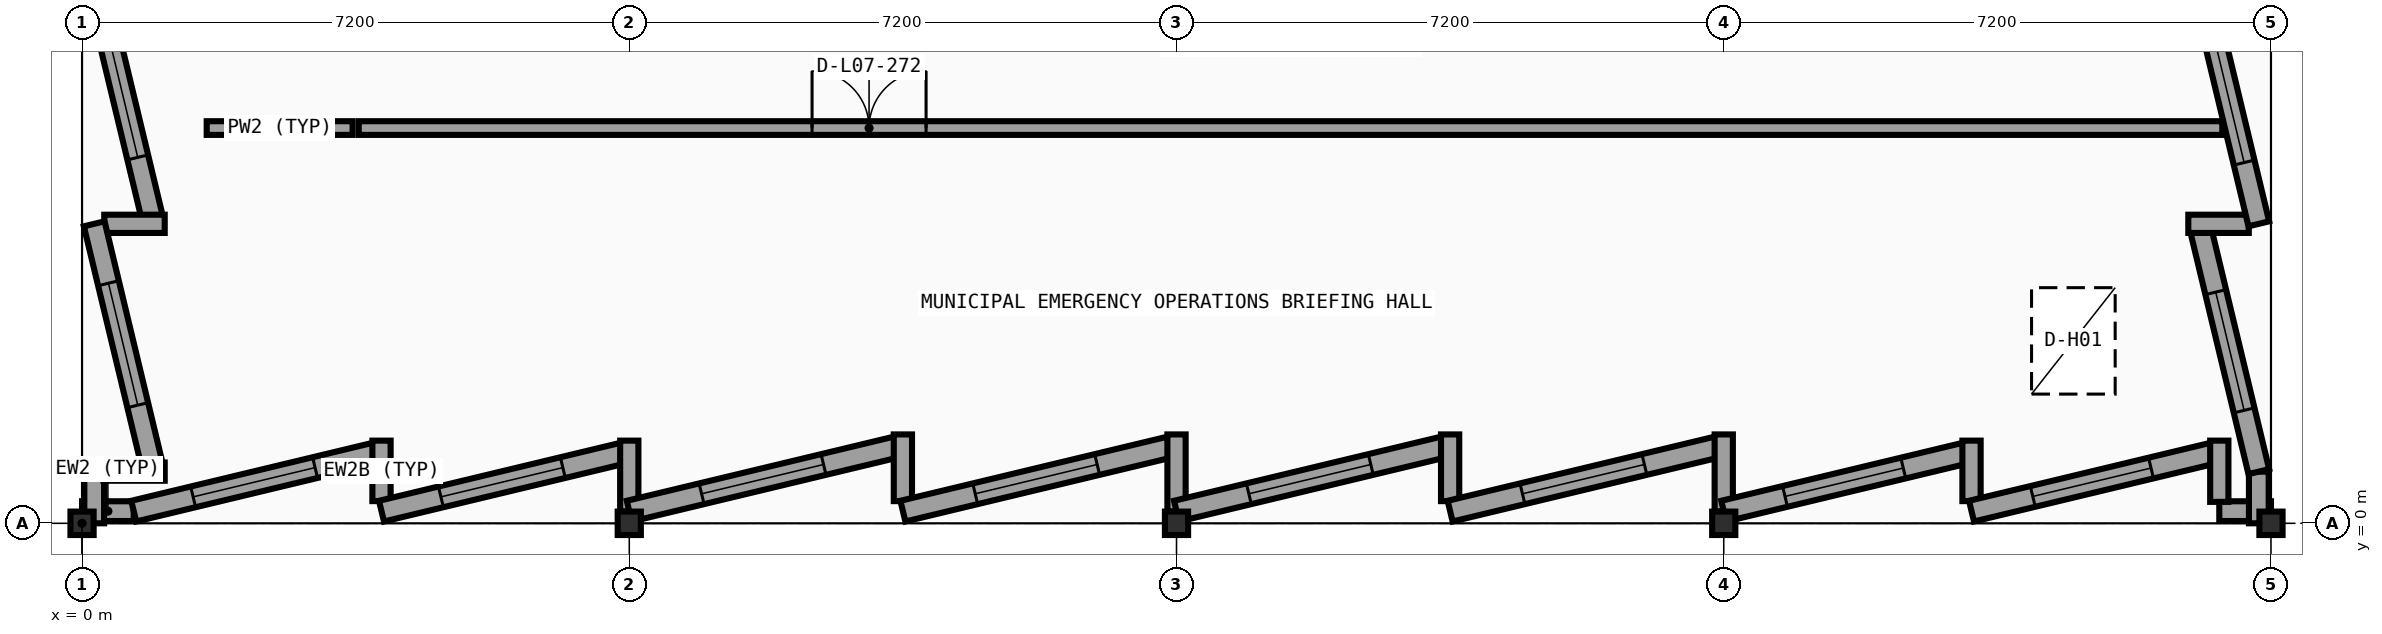
"""IFC4 building model, lengths in metres.
Left out: names, types, materials, properties, quantities, classifications, styles, units other than length and angle.
Written with IfcOpenShell. Run it as: python <this file> out.ifc"""

import sys

from ifc_helpers import new_model, si_unit, direction, frame, frame_2d, origin, origin_2d, place, context, subcontext, project, spatial, rectangle, i_section, extrude, element, fill, save


model = new_model("IFC4")
c1 = context("Model", 3, precision=1e-05, world=origin(), true_north=direction((0.0, 1.0)))
c2 = subcontext(c1, "Body", "Model", "MODEL_VIEW")
j1 = project(units=[si_unit("LENGTHUNIT", "METRE"), si_unit("PLANEANGLEUNIT", "RADIAN")], contexts=[c1])
p1 = place(None, origin())
s1 = spatial("IfcSite", under=j1, at=p1, CompositionType="ELEMENT")
p2 = place(p1, origin())
s2 = spatial("IfcBuilding", under=s1, at=p2, CompositionType="ELEMENT")
p3 = place(p2, frame((0.0, 0.0, 31.05)))
s3 = spatial("IfcBuildingStorey", under=s2, at=p3, CompositionType="ELEMENT", Elevation=31.05)
for number, where, z_axis, x_axis in (
    (1, (0.0, 0.0, 0.0), (0.0, 0.0, 1.0), (1.0, 0.0, 0.0)),
    (2, (7.2, 0.0, 0.0), (0.0, 0.0, 1.0), (1.0, 0.0, 0.0)),
    (3, (14.4, 0.0, 0.0), (0.0, 0.0, 1.0), (1.0, 0.0, 0.0)),
    (4, (21.6, 0.0, 0.0), (0.0, 0.0, 1.0), (1.0, 0.0, 0.0)),
    (5, (28.8, 0.0, 0.0), (0.0, 0.0, 1.0), (1.0, 0.0, 0.0)),
):
    element("IfcColumn", number, at=place(p3, frame(where, z_axis=z_axis, x_axis=x_axis)), inside=s3, PredefinedType="COLUMN", context=c2, shape_type="SweptSolid", body=[
        extrude(i_section(OverallWidth=0.305, OverallDepth=0.308, WebThickness=0.01, FlangeThickness=0.015, FilletRadius=0.015, at=origin_2d()), origin(), (0.0, 0.0, 1.0), 4.2),
    ])
p4 = place(p3, frame((0.0, 0.16, 0.0), z_axis=(0.0, 0.0, 1.0), x_axis=(1.0, 0.0, 0.0)))
e6 = element("IfcWall", 6, at=p4, inside=s3, PredefinedType="SOLIDWALL", context=c2, shape_type="SweptSolid", body=[
    extrude(rectangle(XDim=0.68, YDim=0.26, at=frame_2d((0.34, 0.0))), origin(), (0.0, 0.0, 1.0), 3.95),
])
p5 = place(p3, frame((0.68, 0.16, 0.0), z_axis=(0.0, 0.0, 1.0), x_axis=(0.972370292931, 0.233443812137, 0.0)))
e7 = element("IfcWall", 7, at=p5, inside=s3, PredefinedType="SOLIDWALL", context=c2, shape_type="SweptSolid", body=[
    extrude(rectangle(XDim=3.258, YDim=0.28, at=frame_2d((1.629, 0.0))), origin(), (0.0, 0.0, 1.0), 3.95),
])
p6 = place(p5, frame((0.804, 0.0, 0.8)))
e8 = element("IfcOpeningElement", 8, at=p6, cuts=e7, PredefinedType="OPENING", context=c2, shape_type="SweptSolid", body=[
    extrude(rectangle(XDim=1.65, YDim=1.9, at=frame_2d((0.825, 0.95))), frame((0.0, 0.15, 0.0), z_axis=(0.0, -1.0, 0.0), x_axis=(1.0, 0.0, 0.0)), (0.0, 0.0, 1.0), 0.3),
])
p7 = place(p3, frame((3.94, 1.088, 0.0), z_axis=(0.0, 0.0, 1.0), x_axis=(0.0, -1.0, 0.0)))
e9 = element("IfcWall", 9, at=p7, inside=s3, PredefinedType="SOLIDWALL", context=c2, shape_type="SweptSolid", body=[
    extrude(rectangle(XDim=0.796, YDim=0.24, at=frame_2d((0.398, 0.0))), origin(), (0.0, 0.0, 1.0), 3.95),
])
p8 = place(p3, frame((3.94, 0.16, 0.0), z_axis=(0.0, 0.0, 1.0), x_axis=(0.972370292931, 0.233443812137, 0.0)))
e10 = element("IfcWall", 10, at=p8, inside=s3, PredefinedType="SOLIDWALL", context=c2, shape_type="SweptSolid", body=[
    extrude(rectangle(XDim=3.258, YDim=0.28, at=frame_2d((1.629, 0.0))), origin(), (0.0, 0.0, 1.0), 3.95),
])
p9 = place(p8, frame((0.804, 0.0, 0.8)))
e11 = element("IfcOpeningElement", 11, at=p9, cuts=e10, PredefinedType="OPENING", context=c2, shape_type="SweptSolid", body=[
    extrude(rectangle(XDim=1.65, YDim=1.9, at=frame_2d((0.825, 0.95))), frame((0.0, 0.15, 0.0), z_axis=(0.0, -1.0, 0.0), x_axis=(1.0, 0.0, 0.0)), (0.0, 0.0, 1.0), 0.3),
])
p10 = place(p3, frame((7.2, 1.088, 0.0), z_axis=(0.0, 0.0, 1.0), x_axis=(0.0, -1.0, 0.0)))
e12 = element("IfcWall", 12, at=p10, inside=s3, PredefinedType="SOLIDWALL", context=c2, shape_type="SweptSolid", body=[
    extrude(rectangle(XDim=0.932, YDim=0.24, at=frame_2d((0.466, 0.0))), origin(), (0.0, 0.0, 1.0), 3.95),
])
p11 = place(p3, frame((7.2, 0.16, 0.0), z_axis=(0.0, 0.0, 1.0), x_axis=(0.972357805829, 0.233495818898, 0.0)))
e13 = element("IfcWall", 13, at=p11, inside=s3, PredefinedType="SOLIDWALL", context=c2, shape_type="SweptSolid", body=[
    extrude(rectangle(XDim=3.607, YDim=0.28, at=frame_2d((1.804, 0.0))), origin(), (0.0, 0.0, 1.0), 3.95),
])
p12 = place(p11, frame((0.979, 0.0, 0.8)))
e14 = element("IfcOpeningElement", 14, at=p12, cuts=e13, PredefinedType="OPENING", context=c2, shape_type="SweptSolid", body=[
    extrude(rectangle(XDim=1.65, YDim=1.9, at=frame_2d((0.825, 0.95))), frame((0.0, 0.15, 0.0), z_axis=(0.0, -1.0, 0.0), x_axis=(1.0, 0.0, 0.0)), (0.0, 0.0, 1.0), 0.3),
])
p13 = place(p3, frame((10.8, 1.169, 0.0), z_axis=(0.0, 0.0, 1.0), x_axis=(0.0, -1.0, 0.0)))
e15 = element("IfcWall", 15, at=p13, inside=s3, PredefinedType="SOLIDWALL", context=c2, shape_type="SweptSolid", body=[
    extrude(rectangle(XDim=0.877, YDim=0.24, at=frame_2d((0.438, 0.0))), origin(), (0.0, 0.0, 1.0), 3.95),
])
p14 = place(p3, frame((10.8, 0.16, 0.0), z_axis=(0.0, 0.0, 1.0), x_axis=(0.972357805829, 0.233495818898, 0.0)))
e16 = element("IfcWall", 16, at=p14, inside=s3, PredefinedType="SOLIDWALL", context=c2, shape_type="SweptSolid", body=[
    extrude(rectangle(XDim=3.607, YDim=0.28, at=frame_2d((1.804, 0.0))), origin(), (0.0, 0.0, 1.0), 3.95),
])
p15 = place(p14, frame((0.979, 0.0, 0.8)))
e17 = element("IfcOpeningElement", 17, at=p15, cuts=e16, PredefinedType="OPENING", context=c2, shape_type="SweptSolid", body=[
    extrude(rectangle(XDim=1.65, YDim=1.9, at=frame_2d((0.825, 0.95))), frame((0.0, 0.15, 0.0), z_axis=(0.0, -1.0, 0.0), x_axis=(1.0, 0.0, 0.0)), (0.0, 0.0, 1.0), 0.3),
])
p16 = place(p3, frame((14.4, 1.169, 0.0), z_axis=(0.0, 0.0, 1.0), x_axis=(0.0, -1.0, 0.0)))
e18 = element("IfcWall", 18, at=p16, inside=s3, PredefinedType="SOLIDWALL", context=c2, shape_type="SweptSolid", body=[
    extrude(rectangle(XDim=1.013, YDim=0.24, at=frame_2d((0.507, 0.0))), origin(), (0.0, 0.0, 1.0), 3.95),
])
p17 = place(p3, frame((14.4, 0.16, 0.0), z_axis=(0.0, 0.0, 1.0), x_axis=(0.972361495396, 0.233480453725, 0.0)))
e19 = element("IfcWall", 19, at=p17, inside=s3, PredefinedType="SOLIDWALL", context=c2, shape_type="SweptSolid", body=[
    extrude(rectangle(XDim=3.607, YDim=0.28, at=frame_2d((1.804, 0.0))), origin(), (0.0, 0.0, 1.0), 3.95),
])
p18 = place(p17, frame((0.979, 0.0, 0.8)))
e20 = element("IfcOpeningElement", 20, at=p18, cuts=e19, PredefinedType="OPENING", context=c2, shape_type="SweptSolid", body=[
    extrude(rectangle(XDim=1.65, YDim=1.9, at=frame_2d((0.825, 0.95))), frame((0.0, 0.15, 0.0), z_axis=(0.0, -1.0, 0.0), x_axis=(1.0, 0.0, 0.0)), (0.0, 0.0, 1.0), 0.3),
])
p19 = place(p3, frame((18.0, 1.169, 0.0), z_axis=(0.0, 0.0, 1.0), x_axis=(0.0, -1.0, 0.0)))
e21 = element("IfcWall", 21, at=p19, inside=s3, PredefinedType="SOLIDWALL", context=c2, shape_type="SweptSolid", body=[
    extrude(rectangle(XDim=0.877, YDim=0.24, at=frame_2d((0.438, 0.0))), origin(), (0.0, 0.0, 1.0), 3.95),
])
p20 = place(p3, frame((18.0, 0.16, 0.0), z_axis=(0.0, 0.0, 1.0), x_axis=(0.972357805829, 0.233495818898, 0.0)))
e22 = element("IfcWall", 22, at=p20, inside=s3, PredefinedType="SOLIDWALL", context=c2, shape_type="SweptSolid", body=[
    extrude(rectangle(XDim=3.607, YDim=0.28, at=frame_2d((1.804, 0.0))), origin(), (0.0, 0.0, 1.0), 3.95),
])
p21 = place(p20, frame((0.979, 0.0, 0.8)))
e23 = element("IfcOpeningElement", 23, at=p21, cuts=e22, PredefinedType="OPENING", context=c2, shape_type="SweptSolid", body=[
    extrude(rectangle(XDim=1.65, YDim=1.9, at=frame_2d((0.825, 0.95))), frame((0.0, 0.15, 0.0), z_axis=(0.0, -1.0, 0.0), x_axis=(1.0, 0.0, 0.0)), (0.0, 0.0, 1.0), 0.3),
])
p22 = place(p3, frame((21.6, 1.169, 0.0), z_axis=(0.0, 0.0, 1.0), x_axis=(0.0, -1.0, 0.0)))
e24 = element("IfcWall", 24, at=p22, inside=s3, PredefinedType="SOLIDWALL", context=c2, shape_type="SweptSolid", body=[
    extrude(rectangle(XDim=1.013, YDim=0.24, at=frame_2d((0.507, 0.0))), origin(), (0.0, 0.0, 1.0), 3.95),
])
p23 = place(p3, frame((28.12, 0.16, 0.0), z_axis=(0.0, 0.0, 1.0), x_axis=(1.0, 0.0, 0.0)))
e25 = element("IfcWall", 25, at=p23, inside=s3, PredefinedType="SOLIDWALL", context=c2, shape_type="SweptSolid", body=[
    extrude(rectangle(XDim=0.68, YDim=0.26, at=frame_2d((0.34, 0.0))), origin(), (0.0, 0.0, 1.0), 3.95),
])
p24 = place(p3, frame((21.6, 0.16, 0.0), z_axis=(0.0, 0.0, 1.0), x_axis=(0.972366208453, 0.233460824675, 0.0)))
e26 = element("IfcWall", 26, at=p24, inside=s3, PredefinedType="SOLIDWALL", context=c2, shape_type="SweptSolid", body=[
    extrude(rectangle(XDim=3.258, YDim=0.28, at=frame_2d((1.629, 0.0))), origin(), (0.0, 0.0, 1.0), 3.95),
])
p25 = place(p24, frame((0.829, 0.0, 0.8)))
e27 = element("IfcOpeningElement", 27, at=p25, cuts=e26, PredefinedType="OPENING", context=c2, shape_type="SweptSolid", body=[
    extrude(rectangle(XDim=1.6, YDim=1.75, at=frame_2d((0.8, 0.875))), frame((0.0, 0.15, 0.0), z_axis=(0.0, -1.0, 0.0), x_axis=(1.0, 0.0, 0.0)), (0.0, 0.0, 1.0), 0.3),
])
p26 = place(p3, frame((24.86, 1.088, 0.0), z_axis=(0.0, 0.0, 1.0), x_axis=(0.0, -1.0, 0.0)))
e28 = element("IfcWall", 28, at=p26, inside=s3, PredefinedType="SOLIDWALL", context=c2, shape_type="SweptSolid", body=[
    extrude(rectangle(XDim=0.796, YDim=0.24, at=frame_2d((0.398, 0.0))), origin(), (0.0, 0.0, 1.0), 3.95),
])
p27 = place(p3, frame((24.86, 0.16, 0.0), z_axis=(0.0, 0.0, 1.0), x_axis=(0.972366208453, 0.233460824675, 0.0)))
e29 = element("IfcWall", 29, at=p27, inside=s3, PredefinedType="SOLIDWALL", context=c2, shape_type="SweptSolid", body=[
    extrude(rectangle(XDim=3.258, YDim=0.28, at=frame_2d((1.629, 0.0))), origin(), (0.0, 0.0, 1.0), 3.95),
])
p28 = place(p27, frame((0.829, 0.0, 0.8)))
e30 = element("IfcOpeningElement", 30, at=p28, cuts=e29, PredefinedType="OPENING", context=c2, shape_type="SweptSolid", body=[
    extrude(rectangle(XDim=1.6, YDim=1.75, at=frame_2d((0.8, 0.875))), frame((0.0, 0.15, 0.0), z_axis=(0.0, -1.0, 0.0), x_axis=(1.0, 0.0, 0.0)), (0.0, 0.0, 1.0), 0.3),
])
p29 = place(p3, frame((28.12, 1.088, 0.0), z_axis=(0.0, 0.0, 1.0), x_axis=(0.0, -1.0, 0.0)))
e31 = element("IfcWall", 31, at=p29, inside=s3, PredefinedType="SOLIDWALL", context=c2, shape_type="SweptSolid", body=[
    extrude(rectangle(XDim=0.806, YDim=0.24, at=frame_2d((0.403, 0.0))), origin(), (0.0, 0.0, 1.0), 3.95),
])
p30 = place(p3, frame((28.64, 0.0, 0.0), z_axis=(0.0, 0.0, 1.0), x_axis=(0.0, 1.0, 0.0)))
e32 = element("IfcWall", 32, at=p30, inside=s3, PredefinedType="SOLIDWALL", context=c2, shape_type="SweptSolid", body=[
    extrude(rectangle(XDim=0.68, YDim=0.26, at=frame_2d((0.34, 0.0))), origin(), (0.0, 0.0, 1.0), 3.95),
])
p31 = place(p3, frame((28.64, 0.68, 0.0), z_axis=(0.0, 0.0, 1.0), x_axis=(-0.233443812137, 0.972370292931, 0.0)))
e33 = element("IfcWall", 33, at=p31, inside=s3, PredefinedType="SOLIDWALL", context=c2, shape_type="SweptSolid", body=[
    extrude(rectangle(XDim=3.258, YDim=0.28, at=frame_2d((1.629, 0.0))), origin(), (0.0, 0.0, 1.0), 3.95),
])
p32 = place(p31, frame((0.829, 0.0, 0.8)))
e34 = element("IfcOpeningElement", 34, at=p32, cuts=e33, PredefinedType="OPENING", context=c2, shape_type="SweptSolid", body=[
    extrude(rectangle(XDim=1.6, YDim=1.75, at=frame_2d((0.8, 0.875))), frame((0.0, 0.15, 0.0), z_axis=(0.0, -1.0, 0.0), x_axis=(1.0, 0.0, 0.0)), (0.0, 0.0, 1.0), 0.3),
])
p33 = place(p3, frame((27.712, 3.94, 0.0), z_axis=(0.0, 0.0, 1.0), x_axis=(1.0, 0.0, 0.0)))
e35 = element("IfcWall", 35, at=p33, inside=s3, PredefinedType="SOLIDWALL", context=c2, shape_type="SweptSolid", body=[
    extrude(rectangle(XDim=0.796, YDim=0.24, at=frame_2d((0.398, 0.0))), origin(), (0.0, 0.0, 1.0), 3.95),
])
p34 = place(p3, frame((28.64, 3.94, 0.0), z_axis=(0.0, 0.0, 1.0), x_axis=(-0.233443812137, 0.972370292931, 0.0)))
e36 = element("IfcWall", 36, at=p34, inside=s3, PredefinedType="SOLIDWALL", context=c2, shape_type="SweptSolid", body=[
    extrude(rectangle(XDim=3.258, YDim=0.28, at=frame_2d((1.629, 0.0))), origin(), (0.0, 0.0, 1.0), 3.95),
])
p35 = place(p34, frame((0.829, 0.0, 0.8)))
e37 = element("IfcOpeningElement", 37, at=p35, cuts=e36, PredefinedType="OPENING", context=c2, shape_type="SweptSolid", body=[
    extrude(rectangle(XDim=1.6, YDim=1.75, at=frame_2d((0.8, 0.875))), frame((0.0, 0.15, 0.0), z_axis=(0.0, -1.0, 0.0), x_axis=(1.0, 0.0, 0.0)), (0.0, 0.0, 1.0), 0.3),
])
p36 = place(p3, frame((0.16, 0.68, 0.0), z_axis=(0.0, 0.0, 1.0), x_axis=(0.0, -1.0, 0.0)))
e38 = element("IfcWall", 38, at=p36, inside=s3, PredefinedType="SOLIDWALL", context=c2, shape_type="SweptSolid", body=[
    extrude(rectangle(XDim=0.68, YDim=0.26, at=frame_2d((0.34, 0.0))), origin(), (0.0, 0.0, 1.0), 3.95),
])
p37 = place(p3, frame((0.16, 7.2, 0.0), z_axis=(0.0, 0.0, 1.0), x_axis=(0.233460824675, -0.972366208453, 0.0)))
e39 = element("IfcWall", 39, at=p37, inside=s3, PredefinedType="SOLIDWALL", context=c2, shape_type="SweptSolid", body=[
    extrude(rectangle(XDim=3.258, YDim=0.28, at=frame_2d((1.629, 0.0))), origin(), (0.0, 0.0, 1.0), 3.95),
])
p38 = place(p37, frame((0.804, 0.0, 0.8)))
e40 = element("IfcOpeningElement", 40, at=p38, cuts=e39, PredefinedType="OPENING", context=c2, shape_type="SweptSolid", body=[
    extrude(rectangle(XDim=1.65, YDim=1.9, at=frame_2d((0.825, 0.95))), frame((0.0, 0.15, 0.0), z_axis=(0.0, -1.0, 0.0), x_axis=(1.0, 0.0, 0.0)), (0.0, 0.0, 1.0), 0.3),
])
p39 = place(p3, frame((1.088, 3.94, 0.0), z_axis=(0.0, 0.0, 1.0), x_axis=(-1.0, 0.0, 0.0)))
e41 = element("IfcWall", 41, at=p39, inside=s3, PredefinedType="SOLIDWALL", context=c2, shape_type="SweptSolid", body=[
    extrude(rectangle(XDim=0.796, YDim=0.24, at=frame_2d((0.398, 0.0))), origin(), (0.0, 0.0, 1.0), 3.95),
])
p40 = place(p3, frame((0.16, 3.94, 0.0), z_axis=(0.0, 0.0, 1.0), x_axis=(0.233460824675, -0.972366208453, 0.0)))
e42 = element("IfcWall", 42, at=p40, inside=s3, PredefinedType="SOLIDWALL", context=c2, shape_type="SweptSolid", body=[
    extrude(rectangle(XDim=3.258, YDim=0.28, at=frame_2d((1.629, 0.0))), origin(), (0.0, 0.0, 1.0), 3.95),
])
p41 = place(p40, frame((0.804, 0.0, 0.8)))
e43 = element("IfcOpeningElement", 43, at=p41, cuts=e42, PredefinedType="OPENING", context=c2, shape_type="SweptSolid", body=[
    extrude(rectangle(XDim=1.65, YDim=1.9, at=frame_2d((0.825, 0.95))), frame((0.0, 0.15, 0.0), z_axis=(0.0, -1.0, 0.0), x_axis=(1.0, 0.0, 0.0)), (0.0, 0.0, 1.0), 0.3),
])
p42 = place(p3, frame((1.088, 0.68, 0.0), z_axis=(0.0, 0.0, 1.0), x_axis=(-1.0, 0.0, 0.0)))
e44 = element("IfcWall", 44, at=p42, inside=s3, PredefinedType="SOLIDWALL", context=c2, shape_type="SweptSolid", body=[
    extrude(rectangle(XDim=0.806, YDim=0.24, at=frame_2d((0.403, 0.0))), origin(), (0.0, 0.0, 1.0), 3.95),
])
p43 = place(p3, frame((1.64, 5.2, 0.0), z_axis=(0.0, 0.0, 1.0), x_axis=(1.0, 0.0, 0.0)))
e45 = element("IfcWall", 45, at=p43, inside=s3, PredefinedType="PARTITIONING", context=c2, shape_type="SweptSolid", body=[
    extrude(rectangle(XDim=1.92, YDim=0.18, at=frame_2d((0.96, 0.0))), origin(), (0.0, 0.0, 1.0), 3.95),
])
p44 = place(p3, frame((3.64, 5.2, 0.0), z_axis=(0.0, 0.0, 1.0), x_axis=(1.0, 0.0, 0.0)))
e46 = element("IfcWall", 46, at=p44, inside=s3, PredefinedType="PARTITIONING", context=c2, shape_type="SweptSolid", body=[
    extrude(rectangle(XDim=24.52, YDim=0.18, at=frame_2d((12.26, 0.0))), origin(), (0.0, 0.0, 1.0), 3.95),
])
p45 = place(p44, frame((5.965, 0.0, 0.0)))
e47 = element("IfcOpeningElement", 47, at=p45, cuts=e46, PredefinedType="OPENING", context=c2, shape_type="SweptSolid", body=[
    extrude(rectangle(XDim=1.5, YDim=2.1, at=frame_2d((0.75, 1.05))), frame((0.0, 0.1, 0.0), z_axis=(0.0, -1.0, 0.0), x_axis=(1.0, 0.0, 0.0)), (0.0, 0.0, 1.0), 0.2),
])
p46 = place(p6, origin())
e48 = element("IfcWindow", 48, at=p46, inside=s3, PartitioningType="SINGLE_PANEL", PredefinedType="WINDOW", context=c2, shape_type="SweptSolid", body=[
    extrude(rectangle(XDim=1.65, YDim=1.9, at=frame_2d((0.825, 0.95))), frame((0.0, 0.03, 0.0), z_axis=(0.0, -1.0, 0.0), x_axis=(1.0, 0.0, 0.0)), (0.0, 0.0, 1.0), 0.06),
])
fill(e8, e48)
p47 = place(p9, origin())
e49 = element("IfcWindow", 49, at=p47, inside=s3, PartitioningType="SINGLE_PANEL", PredefinedType="WINDOW", context=c2, shape_type="SweptSolid", body=[
    extrude(rectangle(XDim=1.65, YDim=1.9, at=frame_2d((0.825, 0.95))), frame((0.0, 0.03, 0.0), z_axis=(0.0, -1.0, 0.0), x_axis=(1.0, 0.0, 0.0)), (0.0, 0.0, 1.0), 0.06),
])
fill(e11, e49)
p48 = place(p12, origin())
e50 = element("IfcWindow", 50, at=p48, inside=s3, PartitioningType="SINGLE_PANEL", PredefinedType="WINDOW", context=c2, shape_type="SweptSolid", body=[
    extrude(rectangle(XDim=1.65, YDim=1.9, at=frame_2d((0.825, 0.95))), frame((0.0, 0.03, 0.0), z_axis=(0.0, -1.0, 0.0), x_axis=(1.0, 0.0, 0.0)), (0.0, 0.0, 1.0), 0.06),
])
fill(e14, e50)
p49 = place(p15, origin())
e51 = element("IfcWindow", 51, at=p49, inside=s3, PartitioningType="SINGLE_PANEL", PredefinedType="WINDOW", context=c2, shape_type="SweptSolid", body=[
    extrude(rectangle(XDim=1.65, YDim=1.9, at=frame_2d((0.825, 0.95))), frame((0.0, 0.03, 0.0), z_axis=(0.0, -1.0, 0.0), x_axis=(1.0, 0.0, 0.0)), (0.0, 0.0, 1.0), 0.06),
])
fill(e17, e51)
p50 = place(p18, origin())
e52 = element("IfcWindow", 52, at=p50, inside=s3, PartitioningType="SINGLE_PANEL", PredefinedType="WINDOW", context=c2, shape_type="SweptSolid", body=[
    extrude(rectangle(XDim=1.65, YDim=1.9, at=frame_2d((0.825, 0.95))), frame((0.0, 0.03, 0.0), z_axis=(0.0, -1.0, 0.0), x_axis=(1.0, 0.0, 0.0)), (0.0, 0.0, 1.0), 0.06),
])
fill(e20, e52)
p51 = place(p21, origin())
e53 = element("IfcWindow", 53, at=p51, inside=s3, PartitioningType="SINGLE_PANEL", PredefinedType="WINDOW", context=c2, shape_type="SweptSolid", body=[
    extrude(rectangle(XDim=1.65, YDim=1.9, at=frame_2d((0.825, 0.95))), frame((0.0, 0.03, 0.0), z_axis=(0.0, -1.0, 0.0), x_axis=(1.0, 0.0, 0.0)), (0.0, 0.0, 1.0), 0.06),
])
fill(e23, e53)
p52 = place(p25, origin())
e54 = element("IfcWindow", 54, at=p52, inside=s3, PartitioningType="SINGLE_PANEL", PredefinedType="WINDOW", context=c2, shape_type="SweptSolid", body=[
    extrude(rectangle(XDim=1.6, YDim=1.75, at=frame_2d((0.8, 0.875))), frame((0.0, 0.03, 0.0), z_axis=(0.0, -1.0, 0.0), x_axis=(1.0, 0.0, 0.0)), (0.0, 0.0, 1.0), 0.06),
])
fill(e27, e54)
p53 = place(p28, origin())
e55 = element("IfcWindow", 55, at=p53, inside=s3, PartitioningType="SINGLE_PANEL", PredefinedType="WINDOW", context=c2, shape_type="SweptSolid", body=[
    extrude(rectangle(XDim=1.6, YDim=1.75, at=frame_2d((0.8, 0.875))), frame((0.0, 0.03, 0.0), z_axis=(0.0, -1.0, 0.0), x_axis=(1.0, 0.0, 0.0)), (0.0, 0.0, 1.0), 0.06),
])
fill(e30, e55)
p54 = place(p32, origin())
e56 = element("IfcWindow", 56, at=p54, inside=s3, PartitioningType="SINGLE_PANEL", PredefinedType="WINDOW", context=c2, shape_type="SweptSolid", body=[
    extrude(rectangle(XDim=1.6, YDim=1.75, at=frame_2d((0.8, 0.875))), frame((0.0, 0.03, 0.0), z_axis=(0.0, -1.0, 0.0), x_axis=(1.0, 0.0, 0.0)), (0.0, 0.0, 1.0), 0.06),
])
fill(e34, e56)
p55 = place(p35, origin())
e57 = element("IfcWindow", 57, at=p55, inside=s3, PartitioningType="SINGLE_PANEL", PredefinedType="WINDOW", context=c2, shape_type="SweptSolid", body=[
    extrude(rectangle(XDim=1.6, YDim=1.75, at=frame_2d((0.8, 0.875))), frame((0.0, 0.03, 0.0), z_axis=(0.0, -1.0, 0.0), x_axis=(1.0, 0.0, 0.0)), (0.0, 0.0, 1.0), 0.06),
])
fill(e37, e57)
p56 = place(p38, origin())
e58 = element("IfcWindow", 58, at=p56, inside=s3, PartitioningType="SINGLE_PANEL", PredefinedType="WINDOW", context=c2, shape_type="SweptSolid", body=[
    extrude(rectangle(XDim=1.65, YDim=1.9, at=frame_2d((0.825, 0.95))), frame((0.0, 0.03, 0.0), z_axis=(0.0, -1.0, 0.0), x_axis=(1.0, 0.0, 0.0)), (0.0, 0.0, 1.0), 0.06),
])
fill(e40, e58)
p57 = place(p41, origin())
e59 = element("IfcWindow", 59, at=p57, inside=s3, PartitioningType="SINGLE_PANEL", PredefinedType="WINDOW", context=c2, shape_type="SweptSolid", body=[
    extrude(rectangle(XDim=1.65, YDim=1.9, at=frame_2d((0.825, 0.95))), frame((0.0, 0.03, 0.0), z_axis=(0.0, -1.0, 0.0), x_axis=(1.0, 0.0, 0.0)), (0.0, 0.0, 1.0), 0.06),
])
fill(e43, e59)
p58 = place(p3, frame((0.0, 0.0, -0.25)))
p59 = place(p58, frame((26.2, 2.4, 0.0)))
p60 = place(p59, frame((0.0, 0.0, 0.2)))
e60 = element("IfcDoor", 60, at=p60, inside=s3, OperationType="SINGLE_SWING_LEFT", PredefinedType="TRAPDOOR", context=c2, shape_type="SweptSolid", body=[
    extrude(rectangle(XDim=1.1, YDim=1.4, at=origin_2d()), origin(), (0.0, 0.0, 1.0), 0.05),
])
p61 = place(p45, origin())
e61 = element("IfcDoor", 61, at=p61, inside=s3, OperationType="DOUBLE_DOOR_SINGLE_SWING", PredefinedType="DOOR", context=c2, shape_type="SweptSolid", body=[
    extrude(rectangle(XDim=1.5, YDim=2.1, at=frame_2d((0.75, 1.05))), frame((0.0, 0.025, 0.0), z_axis=(0.0, -1.0, 0.0), x_axis=(1.0, 0.0, 0.0)), (0.0, 0.0, 1.0), 0.05),
])
fill(e47, e61)
save(model, sys.argv[1])
